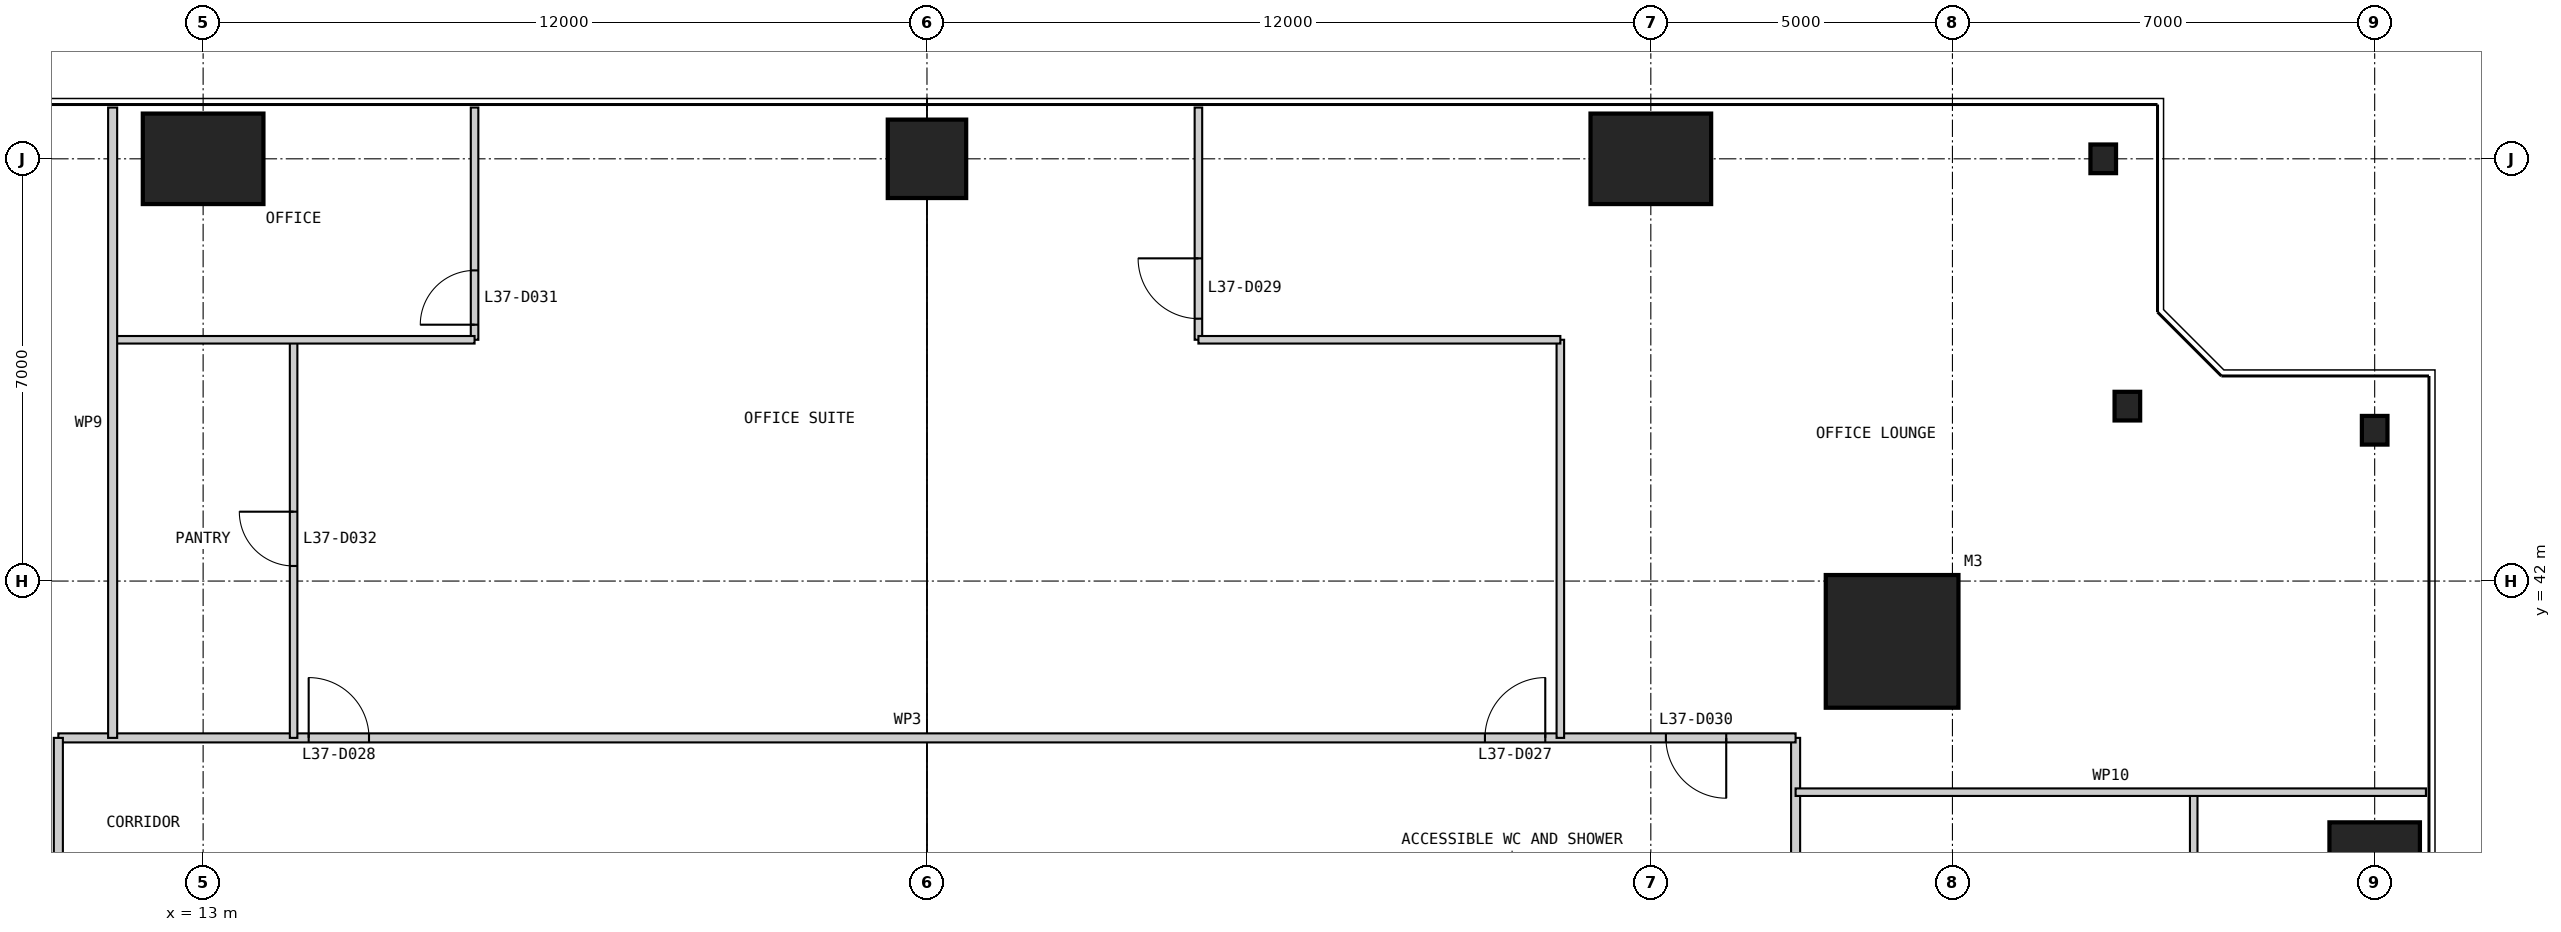
"""IFC4 building model, lengths in metres.
Left out: names, types, materials, properties, quantities, classifications, styles, units other than length and angle.
Written with IfcOpenShell. Run it as: python <this file> out.ifc"""

import sys

from ifc_helpers import new_model, si_unit, direction, frame, frame_2d, origin, origin_2d, place, context, subcontext, project, spatial, rectangle, i_section, extrude, element, fill, save


model = new_model("IFC4")
c1 = context("Model", 3, precision=1e-05, world=origin(), true_north=direction((0.0, 1.0)))
c2 = subcontext(c1, "Body", "Model", "MODEL_VIEW")
j1 = project(units=[si_unit("LENGTHUNIT", "METRE"), si_unit("PLANEANGLEUNIT", "RADIAN")], contexts=[c1])
p1 = place(None, origin())
s1 = spatial("IfcSite", under=j1, at=p1, CompositionType="ELEMENT")
p2 = place(p1, origin())
s2 = spatial("IfcBuilding", under=s1, at=p2, CompositionType="ELEMENT")
p3 = place(p2, frame((0.0, 0.0, 158.4)))
s3 = spatial("IfcBuildingStorey", under=s2, at=p3, CompositionType="ELEMENT", Elevation=158.4)
p4 = place(p3, frame((41.0, 41.0, 0.0), z_axis=(0.0, 0.0, 1.0), x_axis=(1.0, 0.0, 0.0)))
e1 = element("IfcColumn", 1, at=p4, inside=s3, PredefinedType="COLUMN", context=c2, shape_type="SweptSolid", body=[
    extrude(rectangle(XDim=2.2, YDim=2.2, at=origin_2d()), origin(), (0.0, 0.0, 1.0), 4.0),
])
p5 = place(p3, frame((49.0, 37.0, 0.0), z_axis=(0.0, 0.0, 1.0), x_axis=(1.0, 0.0, 0.0)))
e2 = element("IfcColumn", 2, at=p5, inside=s3, PredefinedType="COLUMN", context=c2, shape_type="SweptSolid", body=[
    extrude(rectangle(XDim=1.5, YDim=2.0, at=origin_2d()), origin(), (0.0, 0.0, 1.0), 4.0),
])
for number, where, z_axis, x_axis in (
    (3, (49.0, 44.5, 0.0), (0.0, 0.0, 1.0), (1.0, 0.0, 0.0)),
    (4, (44.9, 44.9, 0.0), (0.0, 0.0, 1.0), (1.0, 0.0, 0.0)),
    (5, (44.5, 49.0, 0.0), (0.0, 0.0, 1.0), (1.0, 0.0, 0.0)),
):
    element("IfcColumn", number, at=place(p3, frame(where, z_axis=z_axis, x_axis=x_axis)), inside=s3, PredefinedType="COLUMN", context=c2, shape_type="SweptSolid", body=[
        extrude(i_section(OverallWidth=0.424, OverallDepth=0.475, WebThickness=0.048, FlangeThickness=0.077, at=origin_2d()), origin(), (0.0, 0.0, 1.0), 4.0),
    ])
p6 = place(p3, frame((37.0, 49.0, 0.0), z_axis=(0.0, 0.0, 1.0), x_axis=(1.0, 0.0, 0.0)))
e6 = element("IfcColumn", 6, at=p6, inside=s3, PredefinedType="COLUMN", context=c2, shape_type="SweptSolid", body=[
    extrude(rectangle(XDim=2.0, YDim=1.5, at=origin_2d()), origin(), (0.0, 0.0, 1.0), 4.0),
])
p7 = place(p3, frame((25.0, 49.0, 0.0), z_axis=(0.0, 0.0, 1.0), x_axis=(1.0, 0.0, 0.0)))
e7 = element("IfcColumn", 7, at=p7, inside=s3, PredefinedType="COLUMN", context=c2, shape_type="SweptSolid", body=[
    extrude(rectangle(XDim=1.3, YDim=1.3, at=origin_2d()), origin(), (0.0, 0.0, 1.0), 4.0),
])
p8 = place(p3, frame((13.0, 49.0, 0.0), z_axis=(0.0, 0.0, 1.0), x_axis=(1.0, 0.0, 0.0)))
e8 = element("IfcColumn", 8, at=p8, inside=s3, PredefinedType="COLUMN", context=c2, shape_type="SweptSolid", body=[
    extrude(rectangle(XDim=2.0, YDim=1.5, at=origin_2d()), origin(), (0.0, 0.0, 1.0), 4.0),
])
p9 = place(p3, frame((39.4, 11.5, 0.0), z_axis=(0.0, 0.0, 1.0), x_axis=(0.0, 1.0, 0.0)))
e9 = element("IfcWall", 9, at=p9, inside=s3, PredefinedType="PARTITIONING", context=c2, shape_type="SweptSolid", body=[
    extrude(rectangle(XDim=27.9, YDim=0.15, at=frame_2d((13.95, 0.0))), origin(), (0.0, 0.0, 1.0), 3.8),
])
p10 = place(p9, frame((3.25, 0.0, 0.0)))
e10 = element("IfcOpeningElement", 10, at=p10, cuts=e9, PredefinedType="OPENING", context=c2, shape_type="SweptSolid", body=[
    extrude(rectangle(XDim=1.0, YDim=2.2, at=frame_2d((0.5, 1.1))), frame((0.0, 0.085, 0.0), z_axis=(0.0, -1.0, 0.0), x_axis=(1.0, 0.0, 0.0)), (0.0, 0.0, 1.0), 0.17),
])
p11 = place(p9, frame((22.75, 0.0, 0.0)))
e11 = element("IfcOpeningElement", 11, at=p11, cuts=e9, PredefinedType="OPENING", context=c2, shape_type="SweptSolid", body=[
    extrude(rectangle(XDim=1.0, YDim=2.2, at=frame_2d((0.5, 1.1))), frame((0.0, 0.085, 0.0), z_axis=(0.0, -1.0, 0.0), x_axis=(1.0, 0.0, 0.0)), (0.0, 0.0, 1.0), 0.17),
])
p12 = place(p9, frame((1.75, 0.0, 0.0)))
e12 = element("IfcOpeningElement", 12, at=p12, cuts=e9, PredefinedType="OPENING", context=c2, shape_type="SweptSolid", body=[
    extrude(rectangle(XDim=1.0, YDim=2.2, at=frame_2d((0.5, 1.1))), frame((0.0, 0.085, 0.0), z_axis=(0.0, -1.0, 0.0), x_axis=(1.0, 0.0, 0.0)), (0.0, 0.0, 1.0), 0.17),
])
p13 = place(p3, frame((46.0, 32.5, 0.0), z_axis=(0.0, 0.0, 1.0), x_axis=(0.0, 1.0, 0.0)))
e13 = element("IfcWall", 13, at=p13, inside=s3, PredefinedType="PARTITIONING", context=c2, shape_type="SweptSolid", body=[
    extrude(rectangle(XDim=6.0, YDim=0.125, at=frame_2d((3.0, 0.0))), origin(), (0.0, 0.0, 1.0), 2.954),
])
p14 = place(p3, frame((39.4, 39.4, 0.0), z_axis=(0.0, 0.0, 1.0), x_axis=(-1.0, 0.0, 0.0)))
e14 = element("IfcWall", 14, at=p14, inside=s3, PredefinedType="PARTITIONING", context=c2, shape_type="SweptSolid", body=[
    extrude(rectangle(XDim=28.8, YDim=0.15, at=frame_2d((14.4, 0.0))), origin(), (0.0, 0.0, 1.0), 3.8),
])
p15 = place(p14, frame((4.15, 0.0, 0.0)))
e15 = element("IfcOpeningElement", 15, at=p15, cuts=e14, PredefinedType="OPENING", context=c2, shape_type="SweptSolid", body=[
    extrude(rectangle(XDim=1.0, YDim=2.2, at=frame_2d((0.5, 1.1))), frame((0.0, 0.085, 0.0), z_axis=(0.0, -1.0, 0.0), x_axis=(1.0, 0.0, 0.0)), (0.0, 0.0, 1.0), 0.17),
])
p16 = place(p14, frame((23.65, 0.0, 0.0)))
e16 = element("IfcOpeningElement", 16, at=p16, cuts=e14, PredefinedType="OPENING", context=c2, shape_type="SweptSolid", body=[
    extrude(rectangle(XDim=1.0, YDim=2.2, at=frame_2d((0.5, 1.1))), frame((0.0, 0.085, 0.0), z_axis=(0.0, -1.0, 0.0), x_axis=(1.0, 0.0, 0.0)), (0.0, 0.0, 1.0), 0.17),
])
p17 = place(p14, frame((1.15, 0.0, 0.0)))
e17 = element("IfcOpeningElement", 17, at=p17, cuts=e14, PredefinedType="OPENING", context=c2, shape_type="SweptSolid", body=[
    extrude(rectangle(XDim=1.0, YDim=2.2, at=frame_2d((0.5, 1.1))), frame((0.0, 0.085, 0.0), z_axis=(0.0, -1.0, 0.0), x_axis=(1.0, 0.0, 0.0)), (0.0, 0.0, 1.0), 0.17),
])
p18 = place(p3, frame((49.85, 38.5, 0.0), z_axis=(0.0, 0.0, 1.0), x_axis=(-1.0, 0.0, 0.0)))
e18 = element("IfcWall", 18, at=p18, inside=s3, PredefinedType="PARTITIONING", context=c2, shape_type="SweptSolid", body=[
    extrude(rectangle(XDim=10.45, YDim=0.125, at=frame_2d((5.225, 0.0))), origin(), (0.0, 0.0, 1.0), 3.8),
])
p19 = place(p3, frame((35.5, 46.0, 0.0), z_axis=(0.0, 0.0, 1.0), x_axis=(0.0, -1.0, 0.0)))
e19 = element("IfcWall", 19, at=p19, inside=s3, PredefinedType="PARTITIONING", context=c2, shape_type="SweptSolid", body=[
    extrude(rectangle(XDim=6.6, YDim=0.125, at=frame_2d((3.3, 0.0))), origin(), (0.0, 0.0, 1.0), 3.8),
])
p20 = place(p3, frame((29.5, 49.85, 0.0), z_axis=(0.0, 0.0, 1.0), x_axis=(0.0, -1.0, 0.0)))
e20 = element("IfcWall", 20, at=p20, inside=s3, PredefinedType="PARTITIONING", context=c2, shape_type="SweptSolid", body=[
    extrude(rectangle(XDim=3.85, YDim=0.125, at=frame_2d((1.925, 0.0))), origin(), (0.0, 0.0, 1.0), 3.8),
])
p21 = place(p20, frame((2.5, 0.0, 0.0)))
e21 = element("IfcOpeningElement", 21, at=p21, cuts=e20, PredefinedType="OPENING", context=c2, shape_type="SweptSolid", body=[
    extrude(rectangle(XDim=1.0, YDim=2.2, at=frame_2d((0.5, 1.1))), frame((0.0, 0.073, 0.0), z_axis=(0.0, -1.0, 0.0), x_axis=(1.0, 0.0, 0.0)), (0.0, 0.0, 1.0), 0.145),
])
p22 = place(p3, frame((17.5, 49.85, 0.0), z_axis=(0.0, 0.0, 1.0), x_axis=(0.0, -1.0, 0.0)))
e22 = element("IfcWall", 22, at=p22, inside=s3, PredefinedType="PARTITIONING", context=c2, shape_type="SweptSolid", body=[
    extrude(rectangle(XDim=3.85, YDim=0.125, at=frame_2d((1.925, 0.0))), origin(), (0.0, 0.0, 1.0), 3.8),
])
p23 = place(p22, frame((2.7, 0.0, 0.0)))
e23 = element("IfcOpeningElement", 23, at=p23, cuts=e22, PredefinedType="OPENING", context=c2, shape_type="SweptSolid", body=[
    extrude(rectangle(XDim=0.9, YDim=2.2, at=frame_2d((0.45, 1.1))), frame((0.0, 0.073, 0.0), z_axis=(0.0, -1.0, 0.0), x_axis=(1.0, 0.0, 0.0)), (0.0, 0.0, 1.0), 0.145),
])
p24 = place(p3, frame((14.5, 46.0, 0.0), z_axis=(0.0, 0.0, 1.0), x_axis=(0.0, -1.0, 0.0)))
e24 = element("IfcWall", 24, at=p24, inside=s3, PredefinedType="PARTITIONING", context=c2, shape_type="SweptSolid", body=[
    extrude(rectangle(XDim=6.6, YDim=0.125, at=frame_2d((3.3, 0.0))), origin(), (0.0, 0.0, 1.0), 3.8),
])
p25 = place(p24, frame((2.85, 0.0, 0.0)))
e25 = element("IfcOpeningElement", 25, at=p25, cuts=e24, PredefinedType="OPENING", context=c2, shape_type="SweptSolid", body=[
    extrude(rectangle(XDim=0.9, YDim=2.2, at=frame_2d((0.45, 1.1))), frame((0.0, 0.073, 0.0), z_axis=(0.0, -1.0, 0.0), x_axis=(1.0, 0.0, 0.0)), (0.0, 0.0, 1.0), 0.145),
])
for number, where, z_axis, x_axis in (
    (26, (35.5, 46.0, 0.0), (0.0, 0.0, 1.0), (-1.0, 0.0, 0.0)),
    (27, (17.5, 46.0, 0.0), (0.0, 0.0, 1.0), (-1.0, 0.0, 0.0)),
):
    element("IfcWall", number, at=place(p3, frame(where, z_axis=z_axis, x_axis=x_axis)), inside=s3, PredefinedType="PARTITIONING", context=c2, shape_type="SweptSolid", body=[
        extrude(rectangle(XDim=6.0, YDim=0.125, at=frame_2d((3.0, 0.0))), origin(), (0.0, 0.0, 1.0), 3.8),
    ])
p26 = place(p3, frame((10.6, 39.4, 0.0), z_axis=(0.0, 0.0, 1.0), x_axis=(0.0, -1.0, 0.0)))
e28 = element("IfcWall", 28, at=p26, inside=s3, PredefinedType="PARTITIONING", context=c2, shape_type="SweptSolid", body=[
    extrude(rectangle(XDim=27.9, YDim=0.15, at=frame_2d((13.95, 0.0))), origin(), (0.0, 0.0, 1.0), 3.8),
])
p27 = place(p26, frame((4.15, 0.0, 0.0)))
e29 = element("IfcOpeningElement", 29, at=p27, cuts=e28, PredefinedType="OPENING", context=c2, shape_type="SweptSolid", body=[
    extrude(rectangle(XDim=1.0, YDim=2.2, at=frame_2d((0.5, 1.1))), frame((0.0, 0.085, 0.0), z_axis=(0.0, -1.0, 0.0), x_axis=(1.0, 0.0, 0.0)), (0.0, 0.0, 1.0), 0.17),
])
p28 = place(p26, frame((25.15, 0.0, 0.0)))
e30 = element("IfcOpeningElement", 30, at=p28, cuts=e28, PredefinedType="OPENING", context=c2, shape_type="SweptSolid", body=[
    extrude(rectangle(XDim=1.0, YDim=2.2, at=frame_2d((0.5, 1.1))), frame((0.0, 0.085, 0.0), z_axis=(0.0, -1.0, 0.0), x_axis=(1.0, 0.0, 0.0)), (0.0, 0.0, 1.0), 0.17),
])
p29 = place(p3, frame((11.5, 49.85, 0.0), z_axis=(0.0, 0.0, 1.0), x_axis=(0.0, -1.0, 0.0)))
e31 = element("IfcWall", 31, at=p29, inside=s3, PredefinedType="PARTITIONING", context=c2, shape_type="SweptSolid", body=[
    extrude(rectangle(XDim=10.45, YDim=0.15, at=frame_2d((5.225, 0.0))), origin(), (0.0, 0.0, 1.0), 3.8),
])
p30 = place(p15, frame((1.0, 0.0, 0.0), z_axis=(0.0, 0.0, 1.0), x_axis=(-1.0, 0.0, 0.0)))
e32 = element("IfcDoor", 32, at=p30, inside=s3, OperationType="SINGLE_SWING_RIGHT", PredefinedType="DOOR", context=c2, shape_type="SweptSolid", body=[
    extrude(rectangle(XDim=1.0, YDim=2.2, at=frame_2d((0.5, 1.1))), frame((0.0, 0.025, 0.0), z_axis=(0.0, -1.0, 0.0), x_axis=(1.0, 0.0, 0.0)), (0.0, 0.0, 1.0), 0.05),
])
fill(e15, e32)
p31 = place(p16, frame((1.0, 0.0, 0.0), z_axis=(0.0, 0.0, 1.0), x_axis=(-1.0, 0.0, 0.0)))
e33 = element("IfcDoor", 33, at=p31, inside=s3, OperationType="SINGLE_SWING_LEFT", PredefinedType="DOOR", context=c2, shape_type="SweptSolid", body=[
    extrude(rectangle(XDim=1.0, YDim=2.2, at=frame_2d((0.5, 1.1))), frame((0.0, 0.025, 0.0), z_axis=(0.0, -1.0, 0.0), x_axis=(1.0, 0.0, 0.0)), (0.0, 0.0, 1.0), 0.05),
])
fill(e16, e33)
p32 = place(p21, frame((1.0, 0.0, 0.0), z_axis=(0.0, 0.0, 1.0), x_axis=(-1.0, 0.0, 0.0)))
e34 = element("IfcDoor", 34, at=p32, inside=s3, OperationType="SINGLE_SWING_RIGHT", PredefinedType="DOOR", context=c2, shape_type="SweptSolid", body=[
    extrude(rectangle(XDim=1.0, YDim=2.2, at=frame_2d((0.5, 1.1))), frame((0.0, 0.025, 0.0), z_axis=(0.0, -1.0, 0.0), x_axis=(1.0, 0.0, 0.0)), (0.0, 0.0, 1.0), 0.05),
])
fill(e21, e34)
p33 = place(p17, origin())
e35 = element("IfcDoor", 35, at=p33, inside=s3, OperationType="SINGLE_SWING_LEFT", PredefinedType="DOOR", context=c2, shape_type="SweptSolid", body=[
    extrude(rectangle(XDim=1.0, YDim=2.2, at=frame_2d((0.5, 1.1))), frame((0.0, 0.025, 0.0), z_axis=(0.0, -1.0, 0.0), x_axis=(1.0, 0.0, 0.0)), (0.0, 0.0, 1.0), 0.05),
])
fill(e17, e35)
p34 = place(p23, frame((0.9, 0.0, 0.0), z_axis=(0.0, 0.0, 1.0), x_axis=(-1.0, 0.0, 0.0)))
e36 = element("IfcDoor", 36, at=p34, inside=s3, OperationType="SINGLE_SWING_LEFT", PredefinedType="DOOR", context=c2, shape_type="SweptSolid", body=[
    extrude(rectangle(XDim=0.9, YDim=2.2, at=frame_2d((0.45, 1.1))), frame((0.0, 0.025, 0.0), z_axis=(0.0, -1.0, 0.0), x_axis=(1.0, 0.0, 0.0)), (0.0, 0.0, 1.0), 0.05),
])
fill(e23, e36)
p35 = place(p25, frame((0.9, 0.0, 0.0), z_axis=(0.0, 0.0, 1.0), x_axis=(-1.0, 0.0, 0.0)))
e37 = element("IfcDoor", 37, at=p35, inside=s3, OperationType="SINGLE_SWING_RIGHT", PredefinedType="DOOR", context=c2, shape_type="SweptSolid", body=[
    extrude(rectangle(XDim=0.9, YDim=2.2, at=frame_2d((0.45, 1.1))), frame((0.0, 0.025, 0.0), z_axis=(0.0, -1.0, 0.0), x_axis=(1.0, 0.0, 0.0)), (0.0, 0.0, 1.0), 0.05),
])
fill(e25, e37)
save(model, sys.argv[1])
